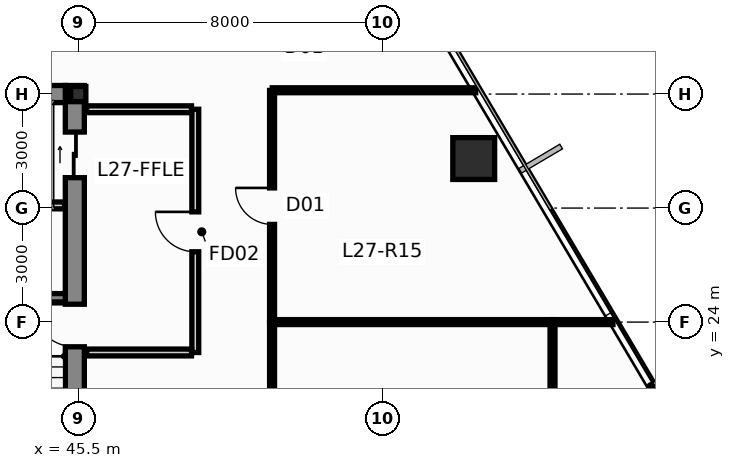
"""IFC4 building model, lengths in metres.
Left out: names, types, materials, properties, quantities, classifications, styles, units other than length and angle.
Written with IfcOpenShell. Run it as: python <this file> out.ifc"""

import sys

from ifc_helpers import new_model, si_unit, direction, frame, frame_2d, origin, origin_2d, place, context, subcontext, project, spatial, rectangle, hollow_rectangle, i_section, extrude, source, transform, mapped, element, fill, save


model = new_model("IFC4")
c1 = context("Model", 3, precision=1e-05, world=origin(), true_north=direction((0.0, 1.0)))
c2 = subcontext(c1, "Body", "Model", "MODEL_VIEW")
j1 = project(units=[si_unit("LENGTHUNIT", "METRE"), si_unit("PLANEANGLEUNIT", "RADIAN")], contexts=[c1])
p1 = place(None, origin())
s1 = spatial("IfcSite", under=j1, at=p1, CompositionType="ELEMENT")
p2 = place(p1, origin())
s2 = spatial("IfcBuilding", under=s1, at=p2, CompositionType="ELEMENT")
p3 = place(p2, frame((0.0, 0.0, 105.4)))
s3 = spatial("IfcBuildingStorey", under=s2, at=p3, CompositionType="ELEMENT", Elevation=105.4)
m1 = source(origin(), c2, "Body", "SweptSolid", [
    extrude(i_section(OverallWidth=0.4, OverallDepth=0.4, WebThickness=0.02, FlangeThickness=0.032, at=origin_2d()), origin(), (0.0, 0.0, 1.0), 3.65),
])
p4 = place(p3, frame((45.5, 30.0, 0.0), z_axis=(0.0, 0.0, 1.0), x_axis=(1.0, 0.0, 0.0)))
e1 = element("IfcColumn", 1, at=p4, inside=s3, PredefinedType="COLUMN", context=c2, shape_type="MappedRepresentation", body=[
    mapped(m1, transform((0.0, 0.0, 0.0), scale=1.0)),
])
p5 = place(p3, frame((45.41, 16.95, 0.0), z_axis=(0.0, 0.0, 1.0), x_axis=(0.0, 1.0, 0.0)))
e2 = element("IfcWall", 2, at=p5, inside=s3, PredefinedType="SHEAR", context=c2, shape_type="SweptSolid", body=[
    extrude(rectangle(XDim=13.275, YDim=0.5, at=frame_2d((6.638, 0.0))), origin(), (0.0, 0.0, 1.0), 3.65),
])
p6 = place(p5, frame((6.4, 0.0, 0.0)))
e3 = element("IfcOpeningElement", 3, at=p6, cuts=e2, PredefinedType="OPENING", context=c2, shape_type="SweptSolid", body=[
    extrude(rectangle(XDim=1.12, YDim=2.15, at=frame_2d((0.56, 1.075))), frame((0.0, 0.262, 0.0), z_axis=(0.0, -1.0, 0.0), x_axis=(1.0, 0.0, 0.0)), (0.0, 0.0, 1.0), 0.524),
])
p7 = place(p5, frame((10.85, 0.0, 0.0)))
e4 = element("IfcOpeningElement", 4, at=p7, cuts=e2, PredefinedType="OPENING", context=c2, shape_type="SweptSolid", body=[
    extrude(rectangle(XDim=1.2, YDim=2.2, at=frame_2d((0.6, 1.1))), frame((0.0, 0.262, 0.0), z_axis=(0.0, -1.0, 0.0), x_axis=(1.0, 0.0, 0.0)), (0.0, 0.0, 1.0), 0.524),
])
p8 = place(p3, frame((42.26, 30.0, 0.0), z_axis=(0.0, 0.0, 1.0), x_axis=(1.0, 0.0, 0.0)))
e5 = element("IfcWall", 5, at=p8, inside=s3, PredefinedType="SHEAR", context=c2, shape_type="SweptSolid", body=[
    extrude(rectangle(XDim=2.9, YDim=0.45, at=frame_2d((1.45, 0.0))), origin(), (0.0, 0.0, 1.0), 3.65),
])
p9 = place(p3, frame((42.26, 24.64, 0.0), z_axis=(0.0, 0.0, 1.0), x_axis=(1.0, 0.0, 0.0)))
e6 = element("IfcWall", 6, at=p9, inside=s3, PredefinedType="SHEAR", context=c2, shape_type="SweptSolid", body=[
    extrude(rectangle(XDim=2.9, YDim=0.22, at=frame_2d((1.45, 0.0))), origin(), (0.0, 0.0, 1.0), 3.65),
])
m2 = source(origin(), c2, "Body", "SweptSolid", [
    extrude(hollow_rectangle(XDim=1.1, YDim=1.1, WallThickness=0.06, at=origin_2d()), origin(), (0.0, 0.0, 1.0), 3.651),
])
p10 = place(p3, frame((55.906, 28.303, 0.0), z_axis=(-0.014912316331, -0.013775502979, 0.999793907933), x_axis=(0.678553674548, -0.734550822447, 0.0)))
e7 = element("IfcColumn", 7, at=p10, inside=s3, PredefinedType="COLUMN", context=c2, shape_type="MappedRepresentation", body=[
    mapped(m2, transform((0.0, 0.0, 0.0), scale=1.0)),
])
p11 = place(p3, frame((48.58, 23.2, 0.0), z_axis=(0.0, 0.0, 1.0), x_axis=(0.0, 1.0, 0.0)))
e8 = element("IfcWall", 8, at=p11, inside=s3, PredefinedType="PARTITIONING", context=c2, shape_type="SweptSolid", body=[
    extrude(rectangle(XDim=6.4, YDim=0.18, at=frame_2d((3.2, 0.0))), origin(), (0.0, 0.0, 1.0), 3.027),
])
p12 = place(p11, frame((2.65, 0.0, 0.0)))
e9 = element("IfcOpeningElement", 9, at=p12, cuts=e8, PredefinedType="OPENING", context=c2, shape_type="SweptSolid", body=[
    extrude(rectangle(XDim=1.05, YDim=2.15, at=frame_2d((0.525, 1.075))), frame((0.0, 0.102, 0.0), z_axis=(0.0, -1.0, 0.0), x_axis=(1.0, 0.0, 0.0)), (0.0, 0.0, 1.0), 0.204),
])
p13 = place(p3, frame((45.72, 23.2, 0.0), z_axis=(0.0, 0.0, 1.0), x_axis=(1.0, 0.0, 0.0)))
e10 = element("IfcWall", 10, at=p13, inside=s3, PredefinedType="PARTITIONING", context=c2, shape_type="SweptSolid", body=[
    extrude(rectangle(XDim=2.76, YDim=0.18, at=frame_2d((1.38, 0.0))), origin(), (0.0, 0.0, 1.0), 3.4),
])
p14 = place(p3, frame((45.72, 29.6, 0.0), z_axis=(0.0, 0.0, 1.0), x_axis=(1.0, 0.0, 0.0)))
e11 = element("IfcWall", 11, at=p14, inside=s3, PredefinedType="PARTITIONING", context=c2, shape_type="SweptSolid", body=[
    extrude(rectangle(XDim=2.76, YDim=0.18, at=frame_2d((1.38, 0.0))), origin(), (0.0, 0.0, 1.0), 2.783),
])
p15 = place(p3, frame((42.24, 27.07, 0.0), z_axis=(0.0, 0.0, 1.0), x_axis=(1.0, 0.0, 0.0)))
e12 = element("IfcWall", 12, at=p15, inside=s3, PredefinedType="PARTITIONING", context=c2, shape_type="SweptSolid", body=[
    extrude(rectangle(XDim=2.9, YDim=0.18, at=frame_2d((1.45, 0.0))), origin(), (0.0, 0.0, 1.0), 3.4),
])
p16 = place(p3, frame((50.605, 24.0, 0.0), z_axis=(0.0, 0.0, 1.0), x_axis=(1.0, 0.0, 0.0)))
e13 = element("IfcWall", 13, at=p16, inside=s3, PredefinedType="PARTITIONING", context=c2, shape_type="SweptSolid", body=[
    extrude(rectangle(XDim=7.37, YDim=0.13, at=frame_2d((3.685, 0.0))), origin(), (0.0, 0.0, 1.0), 3.4),
])
p17 = place(p3, frame((50.6, 17.105, 0.0), z_axis=(0.0, 0.0, 1.0), x_axis=(0.0, 1.0, 0.0)))
e14 = element("IfcWall", 14, at=p17, inside=s3, PredefinedType="PARTITIONING", context=c2, shape_type="SweptSolid", body=[
    extrude(rectangle(XDim=6.89, YDim=0.13, at=frame_2d((3.445, 0.0))), origin(), (0.0, 0.0, 1.0), 3.027),
])
p18 = place(p3, frame((57.98, 17.105, 0.0), z_axis=(0.0, 0.0, 1.0), x_axis=(0.0, 1.0, 0.0)))
e15 = element("IfcWall", 15, at=p18, inside=s3, PredefinedType="PARTITIONING", context=c2, shape_type="SweptSolid", body=[
    extrude(rectangle(XDim=6.89, YDim=0.13, at=frame_2d((3.445, 0.0))), origin(), (0.0, 0.0, 1.0), 3.4),
])
p19 = place(p3, frame((50.6, 24.005, 0.0), z_axis=(0.0, 0.0, 1.0), x_axis=(0.0, 1.0, 0.0)))
e16 = element("IfcWall", 16, at=p19, inside=s3, PredefinedType="PARTITIONING", context=c2, shape_type="SweptSolid", body=[
    extrude(rectangle(XDim=6.09, YDim=0.13, at=frame_2d((3.045, 0.0))), origin(), (0.0, 0.0, 1.0), 3.027),
])
p20 = place(p19, frame((2.565, 0.0, 0.0)))
e17 = element("IfcOpeningElement", 17, at=p20, cuts=e16, PredefinedType="OPENING", context=c2, shape_type="SweptSolid", body=[
    extrude(rectangle(XDim=0.96, YDim=2.15, at=frame_2d((0.48, 1.075))), frame((0.0, 0.077, 0.0), z_axis=(0.0, -1.0, 0.0), x_axis=(1.0, 0.0, 0.0)), (0.0, 0.0, 1.0), 0.154),
])
p21 = place(p3, frame((50.605, 30.1, 0.0), z_axis=(0.0, 0.0, 1.0), x_axis=(1.0, 0.0, 0.0)))
e18 = element("IfcWall", 18, at=p21, inside=s3, PredefinedType="PARTITIONING", context=c2, shape_type="SweptSolid", body=[
    extrude(rectangle(XDim=5.354, YDim=0.13, at=frame_2d((2.677, 0.0))), origin(), (0.0, 0.0, 1.0), 3.4),
])
p22 = place(p3, frame((57.985, 24.0, 0.0), z_axis=(0.0, 0.0, 1.0), x_axis=(1.0, 0.0, 0.0)))
e19 = element("IfcWall", 19, at=p22, inside=s3, PredefinedType="PARTITIONING", context=c2, shape_type="SweptSolid", body=[
    extrude(rectangle(XDim=1.585, YDim=0.13, at=frame_2d((0.792, 0.0))), origin(), (0.0, 0.0, 1.0), 3.4),
])
p23 = place(p6, origin())
e20 = element("IfcDoor", 20, at=p23, inside=s3, OperationType="SINGLE_SWING_RIGHT", PredefinedType="DOOR", context=c2, shape_type="SweptSolid", body=[
    extrude(rectangle(XDim=1.12, YDim=2.15, at=frame_2d((0.56, 1.075))), frame((0.0, 0.025, 0.0), z_axis=(0.0, -1.0, 0.0), x_axis=(1.0, 0.0, 0.0)), (0.0, 0.0, 1.0), 0.05),
])
fill(e3, e20)
p24 = place(p7, origin())
e21 = element("IfcDoor", 21, at=p24, inside=s3, OperationType="SLIDING_TO_RIGHT", PredefinedType="DOOR", context=c2, shape_type="SweptSolid", body=[
    extrude(rectangle(XDim=1.2, YDim=2.2, at=frame_2d((0.6, 1.1))), frame((0.0, 0.025, 0.0), z_axis=(0.0, -1.0, 0.0), x_axis=(1.0, 0.0, 0.0)), (0.0, 0.0, 1.0), 0.05),
])
fill(e4, e21)
p25 = place(p12, origin())
e22 = element("IfcDoor", 22, at=p25, inside=s3, OperationType="SINGLE_SWING_RIGHT", PredefinedType="DOOR", context=c2, shape_type="SweptSolid", body=[
    extrude(rectangle(XDim=1.05, YDim=2.15, at=frame_2d((0.525, 1.075))), frame((0.0, 0.025, 0.0), z_axis=(0.0, -1.0, 0.0), x_axis=(1.0, 0.0, 0.0)), (0.0, 0.0, 1.0), 0.05),
])
fill(e9, e22)
p26 = place(p20, origin())
e23 = element("IfcDoor", 23, at=p26, inside=s3, OperationType="SINGLE_SWING_RIGHT", PredefinedType="DOOR", context=c2, shape_type="SweptSolid", body=[
    extrude(rectangle(XDim=0.96, YDim=2.15, at=frame_2d((0.48, 1.075))), frame((0.0, 0.025, 0.0), z_axis=(0.0, -1.0, 0.0), x_axis=(1.0, 0.0, 0.0)), (0.0, 0.0, 1.0), 0.05),
])
fill(e17, e23)
save(model, sys.argv[1])
